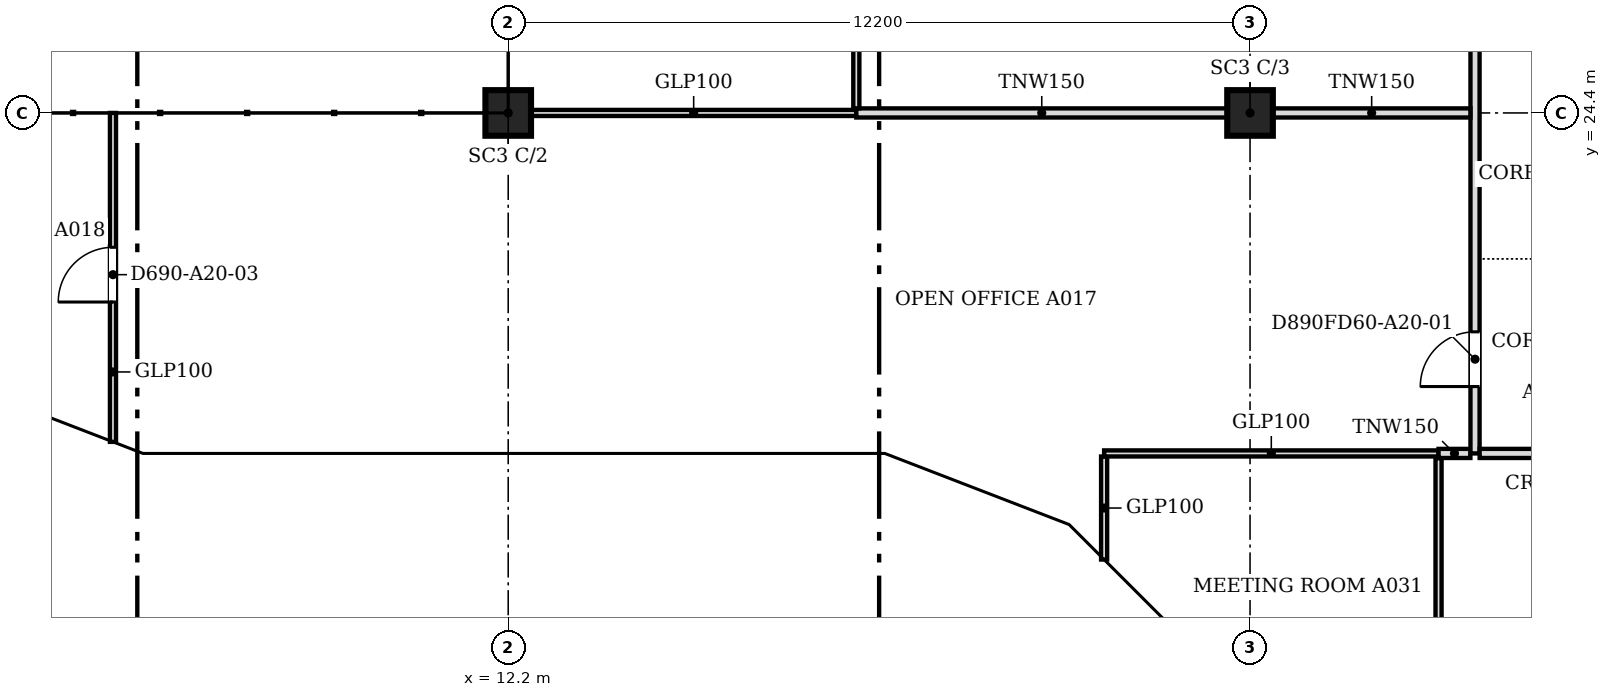
"""IFC4 building model, lengths in metres.
Left out: names, types, materials, properties, quantities, classifications, styles, units other than length and angle.
Written with IfcOpenShell. Run it as: python <this file> out.ifc"""

import sys

from ifc_helpers import new_model, si_unit, direction, frame, frame_2d, origin, origin_2d, place, context, subcontext, project, spatial, polyline, rectangle, outline, extrude, faceted_brep, source, transform, mapped, element, fill, save


model = new_model("IFC4")
c1 = context("Model", 3, precision=1e-05, world=origin(), true_north=direction((0.0, 1.0)))
c2 = subcontext(c1, "Body", "Model", "MODEL_VIEW")
j1 = project(units=[si_unit("LENGTHUNIT", "METRE"), si_unit("PLANEANGLEUNIT", "RADIAN")], contexts=[c1])
p1 = place(None, origin())
s1 = spatial("IfcSite", under=j1, at=p1, CompositionType="ELEMENT")
p2 = place(p1, origin())
s2 = spatial("IfcBuilding", under=s1, at=p2, CompositionType="ELEMENT")
p3 = place(p2, frame((0.0, 0.0, 228.3)))
s3 = spatial("IfcBuildingStorey", under=s2, at=p3, CompositionType="ELEMENT", Elevation=228.3)
for number, where, z_axis, x_axis in (
    (1, (12.2, 24.4, 0.0), (0.0, 0.0, 1.0), (1.0, 0.0, 0.0)),
    (2, (24.4, 24.4, 0.0), (0.0, 0.0, 1.0), (1.0, 0.0, 0.0)),
):
    element("IfcColumn", number, at=place(p3, frame(where, z_axis=z_axis, x_axis=x_axis)), inside=s3, PredefinedType="COLUMN", context=c2, shape_type="SweptSolid", body=[
        extrude(rectangle(XDim=0.75, YDim=0.75, at=origin_2d()), origin(), (0.0, 0.0, 1.0), 3.5),
    ])
m1 = source(origin(), c2, "Body", "Brep", [
    faceted_brep([(2.95, -0.25, 0.0), (2.997, -0.25, 0.059), (2.997, -0.25, 7.541), (2.95, -0.25, 7.6), (0.0, -0.25, 3.8), (0.053, 0.25, 3.868), (2.904, 0.25, 7.54), (2.904, 0.25, 0.06), (0.053, 0.25, 3.732), (2.95, 0.0, 0.0), (2.95, 0.0, 7.6), (0.0, 0.0, 3.8)], [[[0, 1, 2, 3, 4]], [[5, 6, 7, 8]], [[1, 0, 9]], [[10, 3, 2]], [[6, 5, 11, 4, 3, 10]], [[8, 7, 9, 0, 4, 11]], [[8, 11, 5]], [[1, 9, 7, 6, 10, 2]]]),
])
p4 = place(p3, frame((3.394, 19.612, -3.8), z_axis=(0.0, 0.0, 1.0), x_axis=(0.932990326376, -0.359901446078, 0.0)))
e3 = element("IfcWall", 3, at=p4, inside=s3, PredefinedType="SOLIDWALL", context=c2, shape_type="MappedRepresentation", body=[
    mapped(m1, transform((0.0, 0.0, 0.0), scale=1.0)),
])
m2 = source(origin(), c2, "Body", "SweptSolid", [
    extrude(outline(polyline([(2.75, 6.935), (0.316, 3.8), (2.75, 0.665), (2.75, 6.935)])), frame((0.0, 0.26, 0.0), z_axis=(0.0, -1.0, 0.0), x_axis=(1.0, 0.0, 0.0)), (0.0, 0.0, 1.0), 0.52),
])
p5 = place(p4, origin())
e4 = element("IfcOpeningElement", 4, at=p5, cuts=e3, PredefinedType="OPENING", context=c2, shape_type="MappedRepresentation", body=[
    mapped(m2, transform((0.0, 0.0, 0.0), scale=1.0)),
])
m3 = source(origin(), c2, "Body", "Brep", [
    faceted_brep([(0.047, -0.25, 0.0), (3.05, -0.25, 3.8), (0.047, -0.25, 7.6), (0.0, -0.25, 7.54), (0.0, -0.25, 0.06), (0.093, 0.25, 7.541), (3.05, 0.25, 3.8), (0.093, 0.25, 0.059), (0.047, 0.0, 0.0), (0.047, 0.0, 7.6)], [[[0, 1, 2, 3, 4]], [[5, 6, 7]], [[7, 6, 1, 0, 8]], [[6, 5, 9, 2, 1]], [[3, 2, 9]], [[8, 0, 4]], [[7, 8, 4, 3, 9, 5]]]),
])
p6 = place(p3, frame((6.1, 18.55, -3.8), z_axis=(0.0, 0.0, 1.0), x_axis=(1.0, 0.0, 0.0)))
e5 = element("IfcWall", 5, at=p6, inside=s3, PredefinedType="SOLIDWALL", context=c2, shape_type="MappedRepresentation", body=[
    mapped(m3, transform((0.0, 0.0, 0.0), scale=1.0)),
])
m4 = source(origin(), c2, "Body", "SweptSolid", [
    extrude(outline(polyline([(0.247, 0.656), (2.731, 3.8), (0.247, 6.944), (0.247, 0.656)])), frame((0.0, 0.26, 0.0), z_axis=(0.0, -1.0, 0.0), x_axis=(1.0, 0.0, 0.0)), (0.0, 0.0, 1.0), 0.52),
])
p7 = place(p6, origin())
e6 = element("IfcOpeningElement", 6, at=p7, cuts=e5, PredefinedType="OPENING", context=c2, shape_type="MappedRepresentation", body=[
    mapped(m4, transform((0.0, 0.0, 0.0), scale=1.0)),
])
m5 = source(origin(), c2, "Body", "SweptSolid", [
    extrude(outline(polyline([(3.05, 0.0), (6.1, 3.8), (3.05, 7.6), (0.0, 3.8), (3.05, 0.0)])), frame((0.0, 0.25, 0.0), z_axis=(0.0, -1.0, 0.0), x_axis=(1.0, 0.0, 0.0)), (0.0, 0.0, 1.0), 0.5),
])
p8 = place(p3, frame((9.15, 18.55, -3.8), z_axis=(0.0, 0.0, 1.0), x_axis=(1.0, 0.0, 0.0)))
e7 = element("IfcWall", 7, at=p8, inside=s3, PredefinedType="SOLIDWALL", context=c2, shape_type="MappedRepresentation", body=[
    mapped(m5, transform((0.0, 0.0, 0.0), scale=1.0)),
])
m6 = source(origin(), c2, "Body", "SweptSolid", [
    extrude(outline(polyline([(3.05, 0.399), (5.78, 3.8), (3.05, 7.201), (0.321, 3.8), (3.05, 0.399)])), frame((0.0, 0.26, 0.0), z_axis=(0.0, -1.0, 0.0), x_axis=(1.0, 0.0, 0.0)), (0.0, 0.0, 1.0), 0.52),
])
p9 = place(p8, origin())
e8 = element("IfcOpeningElement", 8, at=p9, cuts=e7, PredefinedType="OPENING", context=c2, shape_type="MappedRepresentation", body=[
    mapped(m6, transform((0.0, 0.0, 0.0), scale=1.0)),
])
m7 = source(origin(), c2, "Body", "Brep", [
    faceted_brep([(3.05, -0.25, 7.543), (0.0, -0.25, 3.8), (3.05, -0.25, 0.057), (0.0, 0.25, 3.8), (3.096, 0.25, 7.6), (3.143, 0.25, 7.544), (3.143, 0.25, 0.056), (3.096, 0.25, 0.0), (3.096, -0.0, 0.0), (3.096, -0.0, 7.6)], [[[0, 1, 2]], [[3, 4, 5, 6, 7]], [[7, 6, 8]], [[5, 4, 9]], [[4, 3, 1, 0, 9]], [[3, 7, 8, 2, 1]], [[2, 8, 6, 5, 9, 0]]]),
])
p10 = place(p3, frame((15.25, 18.55, -3.8), z_axis=(0.0, 0.0, 1.0), x_axis=(1.0, 0.0, 0.0)))
e9 = element("IfcWall", 9, at=p10, inside=s3, PredefinedType="SOLIDWALL", context=c2, shape_type="MappedRepresentation", body=[
    mapped(m7, transform((0.0, 0.0, 0.0), scale=1.0)),
])
m8 = source(origin(), c2, "Body", "SweptSolid", [
    extrude(outline(polyline([(2.896, 6.959), (0.323, 3.8), (2.896, 0.641), (2.896, 6.959)])), frame((0.0, 0.26, 0.0), z_axis=(0.0, -1.0, 0.0), x_axis=(1.0, 0.0, 0.0)), (0.0, 0.0, 1.0), 0.52),
])
p11 = place(p10, origin())
e10 = element("IfcOpeningElement", 10, at=p11, cuts=e9, PredefinedType="OPENING", context=c2, shape_type="MappedRepresentation", body=[
    mapped(m8, transform((0.0, 0.0, 0.0), scale=1.0)),
])
m9 = source(origin(), c2, "Body", "Brep", [
    faceted_brep([(0.093, -0.25, 0.056), (3.143, -0.25, 3.736), (3.143, -0.25, 3.864), (0.093, -0.25, 7.544), (0.0, 0.25, 7.543), (0.047, 0.25, 7.6), (3.196, 0.25, 3.8), (0.047, 0.25, 0.0), (0.0, 0.25, 0.057), (3.196, -0.0, 3.8), (0.047, 0.0, 0.0), (0.047, 0.0, 7.6)], [[[0, 1, 2, 3]], [[4, 5, 6, 7, 8]], [[7, 6, 9, 1, 0, 10]], [[6, 5, 11, 3, 2, 9]], [[5, 4, 11]], [[8, 7, 10]], [[8, 10, 0, 3, 11, 4]], [[1, 9, 2]]]),
])
p12 = place(p3, frame((18.303, 18.567, -3.8), z_axis=(0.0, 0.0, 1.0), x_axis=(0.932978940178, -0.359930961693, 0.0)))
e11 = element("IfcWall", 11, at=p12, inside=s3, PredefinedType="SOLIDWALL", context=c2, shape_type="MappedRepresentation", body=[
    mapped(m9, transform((0.0, 0.0, 0.0), scale=1.0)),
])
m10 = source(origin(), c2, "Body", "SweptSolid", [
    extrude(outline(polyline([(0.247, 0.633), (2.871, 3.8), (0.247, 6.967), (0.247, 0.633)])), frame((0.0, 0.26, 0.0), z_axis=(0.0, -1.0, 0.0), x_axis=(1.0, 0.0, 0.0)), (0.0, 0.0, 1.0), 0.52),
])
p13 = place(p12, origin())
e12 = element("IfcOpeningElement", 12, at=p13, cuts=e11, PredefinedType="OPENING", context=c2, shape_type="MappedRepresentation", body=[
    mapped(m10, transform((0.0, 0.0, 0.0), scale=1.0)),
])
m11 = source(origin(), c2, "Body", "Brep", [
    faceted_brep([(3.103, -0.25, 7.536), (0.053, -0.25, 3.864), (0.053, -0.25, 3.736), (3.103, -0.25, 0.064), (0.0, 0.25, 3.8), (3.156, 0.25, 7.6), (3.209, 0.25, 7.536), (3.209, 0.25, 0.064), (3.156, 0.25, 0.0), (3.156, -0.0, 0.0), (3.156, -0.0, 7.6), (0.0, 0.0, 3.8)], [[[0, 1, 2, 3]], [[4, 5, 6, 7, 8]], [[8, 7, 9]], [[6, 5, 10]], [[5, 4, 11, 1, 0, 10]], [[4, 8, 9, 3, 2, 11]], [[11, 2, 1]], [[3, 9, 7, 6, 10, 0]]]),
])
p14 = place(p3, frame((21.285, 17.417, -3.8), z_axis=(0.0, 0.0, 1.0), x_axis=(0.707106781187, -0.707106781187, 0.0)))
e13 = element("IfcWall", 13, at=p14, inside=s3, PredefinedType="SOLIDWALL", context=c2, shape_type="MappedRepresentation", body=[
    mapped(m11, transform((0.0, 0.0, 0.0), scale=1.0)),
])
m12 = source(origin(), c2, "Body", "SweptSolid", [
    extrude(outline(polyline([(2.956, 6.968), (0.325, 3.8), (2.956, 0.632), (2.956, 6.968)])), frame((0.0, 0.26, 0.0), z_axis=(0.0, -1.0, 0.0), x_axis=(1.0, 0.0, 0.0)), (0.0, 0.0, 1.0), 0.52),
])
p15 = place(p14, origin())
e14 = element("IfcOpeningElement", 14, at=p15, cuts=e13, PredefinedType="OPENING", context=c2, shape_type="MappedRepresentation", body=[
    mapped(m12, transform((0.0, 0.0, 0.0), scale=1.0)),
])
m13 = source(origin(), c2, "Body", "Brep", [
    faceted_brep([(0.053, -0.25, 0.0), (3.003, -0.25, 3.8), (0.0, -0.25, 3.8), (0.0, -0.25, 0.068), (0.106, 0.25, 3.8), (2.957, 0.25, 3.8), (2.957, 0.25, 3.74), (0.106, 0.25, 0.068), (3.003, 0.0, 3.8), (0.053, 0.0, 0.0)], [[[0, 1, 2, 3]], [[4, 5, 6, 7]], [[7, 6, 8, 1, 0, 9]], [[5, 4, 2, 1, 8]], [[9, 0, 3]], [[7, 9, 3, 2, 4]], [[6, 5, 8]]]),
])
p16 = place(p3, frame((3.344, 19.631, 0.0), z_axis=(0.0, 0.0, 1.0), x_axis=(0.933007896601, -0.359855894603, 0.0)))
e15 = element("IfcWall", 15, at=p16, inside=s3, PredefinedType="SOLIDWALL", context=c2, shape_type="MappedRepresentation", body=[
    mapped(m13, transform((0.0, 0.0, 0.0), scale=1.0)),
])
m14 = source(origin(), c2, "Body", "SweptSolid", [
    extrude(outline(polyline([(0.253, 0.665), (2.493, 3.55), (0.253, 3.55), (0.253, 0.665)])), frame((0.0, 0.26, 0.0), z_axis=(0.0, -1.0, 0.0), x_axis=(1.0, 0.0, 0.0)), (0.0, 0.0, 1.0), 0.52),
])
p17 = place(p16, origin())
e16 = element("IfcOpeningElement", 16, at=p17, cuts=e15, PredefinedType="OPENING", context=c2, shape_type="MappedRepresentation", body=[
    mapped(m14, transform((0.0, 0.0, 0.0), scale=1.0)),
])
m15 = source(origin(), c2, "Body", "Brep", [
    faceted_brep([(3.003, -0.25, 0.0), (6.053, -0.25, 3.8), (0.0, -0.25, 3.8), (0.047, 0.25, 3.8), (6.053, 0.25, 3.8), (3.003, 0.25, 0.0), (0.047, 0.25, 3.741), (0.0, 0.0, 3.8)], [[[0, 1, 2]], [[3, 4, 5, 6]], [[5, 4, 1, 0]], [[4, 3, 7, 2, 1]], [[6, 5, 0, 2, 7]], [[6, 7, 3]]]),
])
p18 = place(p3, frame((6.146, 18.55, 0.0), z_axis=(0.0, 0.0, 1.0), x_axis=(1.0, 0.0, 0.0)))
e17 = element("IfcWall", 17, at=p18, inside=s3, PredefinedType="SOLIDWALL", context=c2, shape_type="MappedRepresentation", body=[
    mapped(m15, transform((0.0, 0.0, 0.0), scale=1.0)),
])
m16 = source(origin(), c2, "Body", "SweptSolid", [
    extrude(outline(polyline([(3.005, 0.401), (5.532, 3.55), (0.516, 3.55), (3.005, 0.401)])), frame((0.0, 0.26, 0.0), z_axis=(0.0, -1.0, 0.0), x_axis=(1.0, 0.0, 0.0)), (0.0, 0.0, 1.0), 0.52),
])
p19 = place(p18, origin())
e18 = element("IfcOpeningElement", 18, at=p19, cuts=e17, PredefinedType="OPENING", context=c2, shape_type="MappedRepresentation", body=[
    mapped(m16, transform((0.0, 0.0, 0.0), scale=1.0)),
])
m17 = source(origin(), c2, "Body", "Brep", [
    faceted_brep([(3.05, -0.25, 0.0), (6.1, -0.25, 3.743), (6.1, -0.25, 3.8), (0.0, -0.25, 3.8), (0.0, 0.25, 3.8), (6.146, 0.25, 3.8), (3.05, 0.25, 0.0), (6.146, -0.0, 3.8)], [[[0, 1, 2, 3]], [[4, 5, 6]], [[6, 5, 7, 1, 0]], [[5, 4, 3, 2, 7]], [[4, 6, 0, 3]], [[1, 7, 2]]]),
])
p20 = place(p3, frame((12.2, 18.55, 0.0), z_axis=(0.0, 0.0, 1.0), x_axis=(1.0, 0.0, 0.0)))
e19 = element("IfcWall", 19, at=p20, inside=s3, PredefinedType="SOLIDWALL", context=c2, shape_type="MappedRepresentation", body=[
    mapped(m17, transform((0.0, 0.0, 0.0), scale=1.0)),
])
m18 = source(origin(), c2, "Body", "SweptSolid", [
    extrude(outline(polyline([(3.052, 0.397), (5.62, 3.55), (0.521, 3.55), (3.052, 0.397)])), frame((0.0, 0.26, 0.0), z_axis=(0.0, -1.0, 0.0), x_axis=(1.0, 0.0, 0.0)), (0.0, 0.0, 1.0), 0.52),
])
p21 = place(p20, origin())
e20 = element("IfcOpeningElement", 20, at=p21, cuts=e19, PredefinedType="OPENING", context=c2, shape_type="MappedRepresentation", body=[
    mapped(m18, transform((0.0, 0.0, 0.0), scale=1.0)),
])
m19 = source(origin(), c2, "Body", "Brep", [
    faceted_brep([(3.096, -0.25, 3.8), (0.047, -0.25, 3.8), (0.047, -0.25, 3.744), (3.096, -0.25, 0.064), (0.0, 0.25, 3.8), (3.202, 0.25, 3.8), (3.202, 0.25, 0.064), (3.149, 0.25, 0.0), (3.149, -0.0, 0.0), (0.0, 0.0, 3.8)], [[[0, 1, 2, 3]], [[4, 5, 6, 7]], [[7, 6, 8]], [[5, 4, 9, 1, 0]], [[4, 7, 8, 3, 2, 9]], [[2, 1, 9]], [[3, 8, 6, 5, 0]]]),
])
p22 = place(p3, frame((18.346, 18.55, 0.0), z_axis=(0.0, 0.0, 1.0), x_axis=(0.932985567668, -0.359913782069, 0.0)))
e21 = element("IfcWall", 21, at=p22, inside=s3, PredefinedType="SOLIDWALL", context=c2, shape_type="MappedRepresentation", body=[
    mapped(m19, transform((0.0, 0.0, 0.0), scale=1.0)),
])
m20 = source(origin(), c2, "Body", "SweptSolid", [
    extrude(outline(polyline([(2.949, 3.55), (0.532, 3.55), (2.949, 0.633), (2.949, 3.55)])), frame((0.0, 0.26, 0.0), z_axis=(0.0, -1.0, 0.0), x_axis=(1.0, 0.0, 0.0)), (0.0, 0.0, 1.0), 0.52),
])
p23 = place(p22, origin())
e22 = element("IfcOpeningElement", 22, at=p23, cuts=e21, PredefinedType="OPENING", context=c2, shape_type="MappedRepresentation", body=[
    mapped(m20, transform((0.0, 0.0, 0.0), scale=1.0)),
])
m21 = source(origin(), c2, "Body", "Brep", [
    faceted_brep([(0.106, -0.25, 0.064), (3.156, -0.25, 3.736), (3.156, -0.25, 3.8), (0.106, -0.25, 3.8), (0.0, 0.25, 3.8), (3.209, 0.25, 3.8), (0.053, 0.25, 0.0), (0.0, 0.25, 0.064), (3.209, -0.0, 3.8), (0.053, 0.0, 0.0)], [[[0, 1, 2, 3]], [[4, 5, 6, 7]], [[6, 5, 8, 1, 0, 9]], [[5, 4, 3, 2, 8]], [[7, 6, 9]], [[7, 9, 0, 3, 4]], [[1, 8, 2]]]),
])
p24 = place(p3, frame((21.248, 17.454, 0.0), z_axis=(0.0, 0.0, 1.0), x_axis=(0.707106781187, -0.707106781187, 0.0)))
e23 = element("IfcWall", 23, at=p24, inside=s3, PredefinedType="SOLIDWALL", context=c2, shape_type="MappedRepresentation", body=[
    mapped(m21, transform((0.0, 0.0, 0.0), scale=1.0)),
])
m22 = source(origin(), c2, "Body", "SweptSolid", [
    extrude(outline(polyline([(0.253, 0.632), (2.676, 3.55), (0.253, 3.55), (0.253, 0.632)])), frame((0.0, 0.26, 0.0), z_axis=(0.0, -1.0, 0.0), x_axis=(1.0, 0.0, 0.0)), (0.0, 0.0, 1.0), 0.52),
])
p25 = place(p24, origin())
e24 = element("IfcOpeningElement", 24, at=p25, cuts=e23, PredefinedType="OPENING", context=c2, shape_type="MappedRepresentation", body=[
    mapped(m22, transform((0.0, 0.0, 0.0), scale=1.0)),
])
p26 = place(p3, frame((27.5, 10.276, 0.0), z_axis=(0.0, 0.0, 1.0), x_axis=(0.0, 1.0, 0.0)))
e25 = element("IfcWall", 25, at=p26, inside=s3, PredefinedType="PARTITIONING", context=c2, shape_type="SweptSolid", body=[
    extrude(rectangle(XDim=8.448, YDim=0.1, at=frame_2d((4.224, 0.0))), origin(), (0.0, 0.0, 1.0), 2.888),
])
m23 = source(origin(), c2, "Body", "SweptSolid", [
    extrude(rectangle(XDim=0.9, YDim=2.1, at=frame_2d((0.45, 1.05))), frame((0.0, 0.06, 0.0), z_axis=(0.0, -1.0, 0.0), x_axis=(1.0, 0.0, 0.0)), (0.0, 0.0, 1.0), 0.12),
])
p27 = place(p26, frame((3.8, 0.0, 0.0)))
e26 = element("IfcOpeningElement", 26, at=p27, cuts=e25, PredefinedType="OPENING", context=c2, shape_type="MappedRepresentation", body=[
    mapped(m23, transform((0.0, 0.0, 0.0), scale=1.0)),
])
p28 = place(p3, frame((22.0, 17.055, 0.0), z_axis=(0.0, 0.0, 1.0), x_axis=(0.0, 1.0, 0.0)))
e27 = element("IfcWall", 27, at=p28, inside=s3, PredefinedType="PARTITIONING", context=c2, shape_type="SweptSolid", body=[
    extrude(rectangle(XDim=1.694, YDim=0.1, at=frame_2d((0.847, 0.0))), origin(), (0.0, 0.0, 1.0), 2.888),
])
p29 = place(p3, frame((22.0, 18.8, 0.0), z_axis=(0.0, 0.0, 1.0), x_axis=(1.0, 0.0, 0.0)))
e28 = element("IfcWall", 28, at=p29, inside=s3, PredefinedType="PARTITIONING", context=c2, shape_type="SweptSolid", body=[
    extrude(rectangle(XDim=5.499, YDim=0.1, at=frame_2d((2.75, 0.0))), origin(), (0.0, 0.0, 1.0), 2.888),
])
p30 = place(p3, frame((27.5, 18.8, 0.0), z_axis=(0.0, 0.0, 1.0), x_axis=(1.0, 0.0, 0.0)))
e29 = element("IfcWall", 29, at=p30, inside=s3, PredefinedType="PARTITIONING", context=c2, shape_type="SweptSolid", body=[
    extrude(rectangle(XDim=0.524, YDim=0.15, at=frame_2d((0.262, 0.0))), origin(), (0.0, 0.0, 1.0), 2.888),
])
p31 = place(p3, frame((28.1, 18.8, 0.0), z_axis=(0.0, 0.0, 1.0), x_axis=(0.0, 1.0, 0.0)))
e30 = element("IfcWall", 30, at=p31, inside=s3, PredefinedType="PARTITIONING", context=c2, shape_type="SweptSolid", body=[
    extrude(rectangle(XDim=26.424, YDim=0.15, at=frame_2d((13.212, 0.0))), origin(), (0.0, 0.0, 1.0), 2.888),
])
m24 = source(origin(), c2, "Body", "SweptSolid", [
    extrude(rectangle(XDim=0.9, YDim=2.1, at=frame_2d((0.45, 1.05))), frame((0.0, 0.085, 0.0), z_axis=(0.0, -1.0, 0.0), x_axis=(1.0, 0.0, 0.0)), (0.0, 0.0, 1.0), 0.17),
])
p32 = place(p31, frame((1.1, 0.0, 0.0)))
e31 = element("IfcOpeningElement", 31, at=p32, cuts=e30, PredefinedType="OPENING", context=c2, shape_type="MappedRepresentation", body=[
    mapped(m24, transform((0.0, 0.0, 0.0), scale=1.0)),
])
p33 = place(p31, frame((23.151, 0.0, 0.0)))
e32 = element("IfcOpeningElement", 32, at=p33, cuts=e30, PredefinedType="OPENING", context=c2, shape_type="MappedRepresentation", body=[
    mapped(m24, transform((0.0, 0.0, 0.0), scale=1.0)),
])
p34 = place(p31, frame((8.2, 0.0, 0.0)))
e33 = element("IfcOpeningElement", 33, at=p34, cuts=e30, PredefinedType="OPENING", context=c2, shape_type="MappedRepresentation", body=[
    mapped(m24, transform((0.0, 0.0, 0.0), scale=1.0)),
])
p35 = place(p31, frame((15.8, 0.0, 0.0)))
e34 = element("IfcOpeningElement", 34, at=p35, cuts=e30, PredefinedType="OPENING", context=c2, shape_type="MappedRepresentation", body=[
    mapped(m24, transform((0.0, 0.0, 0.0), scale=1.0)),
])
p36 = place(p3, frame((28.176, 18.8, 0.0), z_axis=(0.0, 0.0, 1.0), x_axis=(1.0, 0.0, 0.0)))
e35 = element("IfcWall", 35, at=p36, inside=s3, PredefinedType="PARTITIONING", context=c2, shape_type="SweptSolid", body=[
    extrude(rectangle(XDim=2.248, YDim=0.15, at=frame_2d((1.124, 0.0))), origin(), (0.0, 0.0, 1.0), 2.888),
])
p37 = place(p3, frame((5.7, 18.99, 0.0), z_axis=(0.0, 0.0, 1.0), x_axis=(0.0, 1.0, 0.0)))
e36 = element("IfcWall", 36, at=p37, inside=s3, PredefinedType="PARTITIONING", context=c2, shape_type="SweptSolid", body=[
    extrude(rectangle(XDim=5.41, YDim=0.1, at=frame_2d((2.705, 0.0))), origin(), (0.0, 0.0, 1.0), 2.888),
])
p38 = place(p37, frame((2.3, 0.0, 0.0)))
e37 = element("IfcOpeningElement", 37, at=p38, cuts=e36, PredefinedType="OPENING", context=c2, shape_type="MappedRepresentation", body=[
    mapped(m23, transform((0.0, 0.0, 0.0), scale=1.0)),
])
p39 = place(p3, frame((12.576, 24.4, 0.0), z_axis=(0.0, 0.0, 1.0), x_axis=(1.0, 0.0, 0.0)))
e38 = element("IfcWall", 38, at=p39, inside=s3, PredefinedType="PARTITIONING", context=c2, shape_type="SweptSolid", body=[
    extrude(rectangle(XDim=5.348, YDim=0.1, at=frame_2d((2.674, 0.0))), origin(), (0.0, 0.0, 1.0), 2.888),
])
p40 = place(p3, frame((17.925, 24.4, 0.0), z_axis=(0.0, 0.0, 1.0), x_axis=(1.0, 0.0, 0.0)))
e39 = element("IfcWall", 39, at=p40, inside=s3, PredefinedType="PARTITIONING", context=c2, shape_type="SweptSolid", body=[
    extrude(rectangle(XDim=6.099, YDim=0.15, at=frame_2d((3.049, 0.0))), origin(), (0.0, 0.0, 1.0), 2.888),
])
p41 = place(p3, frame((24.776, 24.4, 0.0), z_axis=(0.0, 0.0, 1.0), x_axis=(1.0, 0.0, 0.0)))
e40 = element("IfcWall", 40, at=p41, inside=s3, PredefinedType="PARTITIONING", context=c2, shape_type="SweptSolid", body=[
    extrude(rectangle(XDim=3.248, YDim=0.15, at=frame_2d((1.624, 0.0))), origin(), (0.0, 0.0, 1.0), 2.888),
])
p42 = place(p3, frame((17.925, 24.476, 0.0), z_axis=(0.0, 0.0, 1.0), x_axis=(0.0, 1.0, 0.0)))
e41 = element("IfcWall", 41, at=p42, inside=s3, PredefinedType="PARTITIONING", context=c2, shape_type="SweptSolid", body=[
    extrude(rectangle(XDim=5.948, YDim=0.1, at=frame_2d((2.974, 0.0))), origin(), (0.0, 0.0, 1.0), 2.888),
])
p43 = place(p42, frame((2.5, 0.0, 0.0)))
e42 = element("IfcOpeningElement", 42, at=p43, cuts=e41, PredefinedType="OPENING", context=c2, shape_type="MappedRepresentation", body=[
    mapped(m23, transform((0.0, 0.0, 0.0), scale=1.0)),
])
m25 = source(origin(), c2, "Body", "SweptSolid", [
    extrude(rectangle(XDim=0.9, YDim=2.1, at=frame_2d((0.45, 1.05))), frame((0.0, 0.025, 0.0), z_axis=(0.0, -1.0, 0.0), x_axis=(1.0, 0.0, 0.0)), (0.0, 0.0, 1.0), 0.05),
])
p44 = place(p32, origin())
e43 = element("IfcDoor", 43, at=p44, inside=s3, OperationType="SINGLE_SWING_LEFT", PredefinedType="DOOR", context=c2, shape_type="MappedRepresentation", body=[
    mapped(m25, transform((0.0, 0.0, 0.0), scale=1.0)),
])
fill(e31, e43)
p45 = place(p38, origin())
e44 = element("IfcDoor", 44, at=p45, inside=s3, OperationType="SINGLE_SWING_LEFT", PredefinedType="DOOR", context=c2, shape_type="MappedRepresentation", body=[
    mapped(m25, transform((0.0, 0.0, 0.0), scale=1.0)),
])
fill(e37, e44)
save(model, sys.argv[1])
